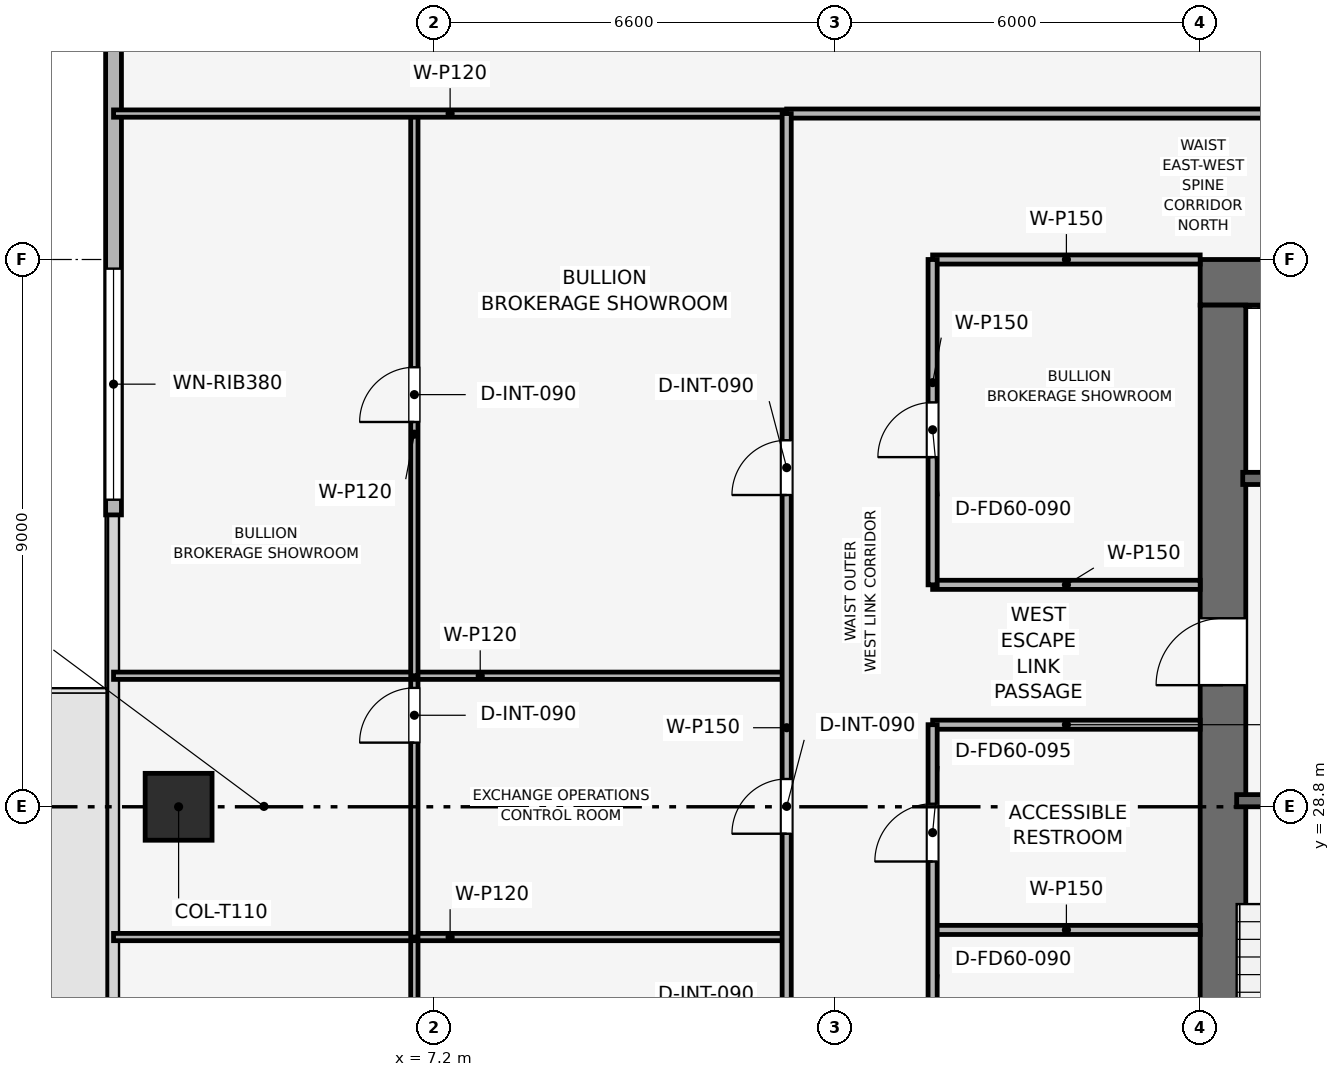
"""IFC4 building model, lengths in metres.
Left out: names, types, materials, properties, quantities, classifications, styles, units other than length and angle.
Written with IfcOpenShell. Run it as: python <this file> out.ifc"""

import sys

from ifc_helpers import new_model, si_unit, direction, frame, frame_2d, origin, origin_2d, place, context, subcontext, project, spatial, rectangle, extrude, element, fill, save


model = new_model("IFC4")
c1 = context("Model", 3, precision=1e-05, world=origin(), true_north=direction((0.0, 1.0)))
c2 = subcontext(c1, "Body", "Model", "MODEL_VIEW")
j1 = project(units=[si_unit("LENGTHUNIT", "METRE"), si_unit("PLANEANGLEUNIT", "RADIAN")], contexts=[c1])
p1 = place(None, origin())
s1 = spatial("IfcSite", under=j1, at=p1, CompositionType="ELEMENT")
p2 = place(p1, origin())
s2 = spatial("IfcBuilding", under=s1, at=p2, CompositionType="ELEMENT")
p3 = place(p2, frame((0.0, 0.0, 199.95)))
s3 = spatial("IfcBuildingStorey", under=s2, at=p3, CompositionType="ELEMENT", Elevation=199.95)
p4 = place(p3, frame((19.8, 37.425, 0.0), z_axis=(0.0, 0.0, 1.0), x_axis=(1.0, 0.0, 0.0)))
e1 = element("IfcWall", 1, at=p4, inside=s3, PredefinedType="SHEAR", context=c2, shape_type="SweptSolid", body=[
    extrude(rectangle(XDim=18.0, YDim=0.75, at=frame_2d((9.0, 0.0))), origin(), (0.0, 0.0, 1.0), 3.75),
])
p5 = place(p4, frame((7.05, 0.0, 0.0)))
e2 = element("IfcOpeningElement", 2, at=p5, cuts=e1, PredefinedType="OPENING", context=c2, shape_type="SweptSolid", body=[
    extrude(rectangle(XDim=1.1, YDim=2.15, at=frame_2d((0.55, 1.075))), frame((0.0, 0.385, 0.0), z_axis=(0.0, -1.0, 0.0), x_axis=(1.0, 0.0, 0.0)), (0.0, 0.0, 1.0), 0.77),
])
p6 = place(p3, frame((20.175, 20.55, 0.0), z_axis=(0.0, 0.0, 1.0), x_axis=(0.0, 1.0, 0.0)))
e3 = element("IfcWall", 3, at=p6, inside=s3, PredefinedType="SHEAR", context=c2, shape_type="SweptSolid", body=[
    extrude(rectangle(XDim=16.5, YDim=0.75, at=frame_2d((8.25, 0.0))), origin(), (0.0, 0.0, 1.0), 3.75),
])
p7 = place(p6, frame((10.25, 0.0, 0.0)))
e4 = element("IfcOpeningElement", 4, at=p7, cuts=e3, PredefinedType="OPENING", context=c2, shape_type="SweptSolid", body=[
    extrude(rectangle(XDim=1.1, YDim=2.15, at=frame_2d((0.55, 1.075))), frame((0.0, 0.385, 0.0), z_axis=(0.0, -1.0, 0.0), x_axis=(1.0, 0.0, 0.0)), (0.0, 0.0, 1.0), 0.77),
])
p8 = place(p3, frame((3.0, 28.8, 0.003), z_axis=(0.0, 0.0, 1.0), x_axis=(1.0, 0.0, 0.0)))
e5 = element("IfcColumn", 5, at=p8, inside=s3, PredefinedType="COLUMN", context=c2, shape_type="SweptSolid", body=[
    extrude(rectangle(XDim=1.1, YDim=1.1, at=origin_2d()), origin(), (0.0, 0.0, 1.0), 3.494),
])
p9 = place(p3, frame((1.93, 33.6, 0.0), z_axis=(0.0, 0.0, 1.0), x_axis=(0.0, 1.0, 0.0)))
e6 = element("IfcWall", 6, at=p9, inside=s3, PredefinedType="SOLIDWALL", context=c2, shape_type="SweptSolid", body=[
    extrude(rectangle(XDim=14.7, YDim=0.26, at=frame_2d((7.35, 0.0))), origin(), (0.0, 0.0, 1.0), 3.5),
])
p10 = place(p9, frame((0.25, 0.0, 0.9)))
e7 = element("IfcOpeningElement", 7, at=p10, cuts=e6, PredefinedType="OPENING", context=c2, shape_type="SweptSolid", body=[
    extrude(rectangle(XDim=3.8, YDim=1.9, at=frame_2d((1.9, 0.95))), frame((0.0, 0.14, 0.0), z_axis=(0.0, -1.0, 0.0), x_axis=(1.0, 0.0, 0.0)), (0.0, 0.0, 1.0), 0.28),
])
p11 = place(p3, frame((20.4, 28.9, 0.0), z_axis=(0.0, 0.0, 1.0), x_axis=(1.0, 0.0, 0.0)))
e8 = element("IfcWall", 8, at=p11, inside=s3, PredefinedType="SHEAR", context=c2, shape_type="SweptSolid", body=[
    extrude(rectangle(XDim=3.15, YDim=0.2, at=frame_2d((1.575, 0.0))), origin(), (0.0, 0.0, 1.0), 3.5),
])
p12 = place(p11, frame((0.8, 0.0, 0.0)))
e9 = element("IfcOpeningElement", 9, at=p12, cuts=e8, PredefinedType="OPENING", context=c2, shape_type="SweptSolid", body=[
    extrude(rectangle(XDim=1.0, YDim=2.1, at=frame_2d((0.5, 1.05))), frame((0.0, 0.11, 0.0), z_axis=(0.0, -1.0, 0.0), x_axis=(1.0, 0.0, 0.0)), (0.0, 0.0, 1.0), 0.22),
])
p13 = place(p3, frame((20.5, 34.2, 0.0), z_axis=(0.0, 0.0, 1.0), x_axis=(1.0, 0.0, 0.0)))
e10 = element("IfcWall", 10, at=p13, inside=s3, PredefinedType="SHEAR", context=c2, shape_type="SweptSolid", body=[
    extrude(rectangle(XDim=3.05, YDim=0.2, at=frame_2d((1.525, 0.0))), origin(), (0.0, 0.0, 1.0), 3.5),
])
p14 = place(p13, frame((0.75, 0.0, 0.0)))
e11 = element("IfcOpeningElement", 11, at=p14, cuts=e10, PredefinedType="OPENING", context=c2, shape_type="SweptSolid", body=[
    extrude(rectangle(XDim=1.1, YDim=2.15, at=frame_2d((0.55, 1.075))), frame((0.0, 0.11, 0.0), z_axis=(0.0, -1.0, 0.0), x_axis=(1.0, 0.0, 0.0)), (0.0, 0.0, 1.0), 0.22),
])
for number, where, z_axis, x_axis in (
    (12, (15.4, 26.775, 0.0), (0.0, 0.0, 1.0), (1.0, 0.0, 0.0)),
    (13, (15.4, 30.15, 0.0), (0.0, 0.0, 1.0), (1.0, 0.0, 0.0)),
    (14, (15.4, 32.45, 0.0), (0.0, 0.0, 1.0), (1.0, 0.0, 0.0)),
):
    element("IfcWall", number, at=place(p3, frame(where, z_axis=z_axis, x_axis=x_axis)), inside=s3, PredefinedType="PARTITIONING", context=c2, shape_type="SweptSolid", body=[
        extrude(rectangle(XDim=4.4, YDim=0.15, at=frame_2d((2.2, 0.0))), origin(), (0.0, 0.0, 1.0), 3.5),
    ])
p15 = place(p3, frame((15.4, 37.8, 0.0), z_axis=(0.0, 0.0, 1.0), x_axis=(1.0, 0.0, 0.0)))
e15 = element("IfcWall", 15, at=p15, inside=s3, PredefinedType="PARTITIONING", context=c2, shape_type="SweptSolid", body=[
    extrude(rectangle(XDim=4.4, YDim=0.15, at=frame_2d((2.2, 0.0))), origin(), (0.0, 0.0, 1.0), 3.035),
])
p16 = place(p3, frame((15.4, 19.8, 0.0), z_axis=(0.0, 0.0, 1.0), x_axis=(0.0, 1.0, 0.0)))
e16 = element("IfcWall", 16, at=p16, inside=s3, PredefinedType="PARTITIONING", context=c2, shape_type="SweptSolid", body=[
    extrude(rectangle(XDim=10.35, YDim=0.15, at=frame_2d((5.175, 0.0))), origin(), (0.0, 0.0, 1.0), 3.035),
])
p17 = place(p16, frame((1.2, 0.0, 0.0)))
e17 = element("IfcOpeningElement", 17, at=p17, cuts=e16, PredefinedType="OPENING", context=c2, shape_type="SweptSolid", body=[
    extrude(rectangle(XDim=0.9, YDim=2.1, at=frame_2d((0.45, 1.05))), frame((0.0, 0.085, 0.0), z_axis=(0.0, -1.0, 0.0), x_axis=(1.0, 0.0, 0.0)), (0.0, 0.0, 1.0), 0.17),
])
p18 = place(p16, frame((4.7, 0.0, 0.0)))
e18 = element("IfcOpeningElement", 18, at=p18, cuts=e16, PredefinedType="OPENING", context=c2, shape_type="SweptSolid", body=[
    extrude(rectangle(XDim=0.9, YDim=2.1, at=frame_2d((0.45, 1.05))), frame((0.0, 0.085, 0.0), z_axis=(0.0, -1.0, 0.0), x_axis=(1.0, 0.0, 0.0)), (0.0, 0.0, 1.0), 0.17),
])
p19 = place(p16, frame((8.1, 0.0, 0.0)))
e19 = element("IfcOpeningElement", 19, at=p19, cuts=e16, PredefinedType="OPENING", context=c2, shape_type="SweptSolid", body=[
    extrude(rectangle(XDim=0.95, YDim=2.1, at=frame_2d((0.475, 1.05))), frame((0.0, 0.085, 0.0), z_axis=(0.0, -1.0, 0.0), x_axis=(1.0, 0.0, 0.0)), (0.0, 0.0, 1.0), 0.17),
])
p20 = place(p3, frame((15.4, 32.45, 0.0), z_axis=(0.0, 0.0, 1.0), x_axis=(0.0, 1.0, 0.0)))
e20 = element("IfcWall", 20, at=p20, inside=s3, PredefinedType="PARTITIONING", context=c2, shape_type="SweptSolid", body=[
    extrude(rectangle(XDim=5.35, YDim=0.15, at=frame_2d((2.675, 0.0))), origin(), (0.0, 0.0, 1.0), 3.035),
])
p21 = place(p20, frame((2.1, 0.0, 0.0)))
e21 = element("IfcOpeningElement", 21, at=p21, cuts=e20, PredefinedType="OPENING", context=c2, shape_type="SweptSolid", body=[
    extrude(rectangle(XDim=0.9, YDim=2.1, at=frame_2d((0.45, 1.05))), frame((0.0, 0.085, 0.0), z_axis=(0.0, -1.0, 0.0), x_axis=(1.0, 0.0, 0.0)), (0.0, 0.0, 1.0), 0.17),
])
p22 = place(p3, frame((6.877, 22.1, 0.0), z_axis=(0.0, 0.0, 1.0), x_axis=(0.0, 1.0, 0.0)))
e22 = element("IfcWall", 22, at=p22, inside=s3, PredefinedType="PARTITIONING", context=c2, shape_type="SweptSolid", body=[
    extrude(rectangle(XDim=4.558, YDim=0.12, at=frame_2d((2.279, 0.0))), origin(), (0.0, 0.0, 1.0), 3.5),
])
p23 = place(p22, frame((0.2, 0.0, 0.0)))
e23 = element("IfcOpeningElement", 23, at=p23, cuts=e22, PredefinedType="OPENING", context=c2, shape_type="SweptSolid", body=[
    extrude(rectangle(XDim=0.9, YDim=2.1, at=frame_2d((0.45, 1.05))), frame((0.0, 0.07, 0.0), z_axis=(0.0, -1.0, 0.0), x_axis=(1.0, 0.0, 0.0)), (0.0, 0.0, 1.0), 0.14),
])
p24 = place(p3, frame((1.93, 26.658, 0.0), z_axis=(0.0, 0.0, 1.0), x_axis=(1.0, 0.0, 0.0)))
e24 = element("IfcWall", 24, at=p24, inside=s3, PredefinedType="PARTITIONING", context=c2, shape_type="SweptSolid", body=[
    extrude(rectangle(XDim=11.07, YDim=0.12, at=frame_2d((5.535, 0.0))), origin(), (0.0, 0.0, 1.0), 2.885),
])
p25 = place(p3, frame((6.877, 26.658, 0.0), z_axis=(0.0, 0.0, 1.0), x_axis=(0.0, 1.0, 0.0)))
e25 = element("IfcWall", 25, at=p25, inside=s3, PredefinedType="PARTITIONING", context=c2, shape_type="SweptSolid", body=[
    extrude(rectangle(XDim=4.297, YDim=0.12, at=frame_2d((2.148, 0.0))), origin(), (0.0, 0.0, 1.0), 3.035),
])
p26 = place(p25, frame((3.197, 0.0, 0.0)))
e26 = element("IfcOpeningElement", 26, at=p26, cuts=e25, PredefinedType="OPENING", context=c2, shape_type="SweptSolid", body=[
    extrude(rectangle(XDim=0.9, YDim=2.1, at=frame_2d((0.45, 1.05))), frame((0.0, 0.07, 0.0), z_axis=(0.0, -1.0, 0.0), x_axis=(1.0, 0.0, 0.0)), (0.0, 0.0, 1.0), 0.14),
])
p27 = place(p3, frame((1.93, 30.955, 0.0), z_axis=(0.0, 0.0, 1.0), x_axis=(1.0, 0.0, 0.0)))
e27 = element("IfcWall", 27, at=p27, inside=s3, PredefinedType="PARTITIONING", context=c2, shape_type="SweptSolid", body=[
    extrude(rectangle(XDim=11.07, YDim=0.12, at=frame_2d((5.535, 0.0))), origin(), (0.0, 0.0, 1.0), 2.885),
])
p28 = place(p3, frame((6.877, 30.955, 0.0), z_axis=(0.0, 0.0, 1.0), x_axis=(0.0, 1.0, 0.0)))
e28 = element("IfcWall", 28, at=p28, inside=s3, PredefinedType="PARTITIONING", context=c2, shape_type="SweptSolid", body=[
    extrude(rectangle(XDim=9.245, YDim=0.12, at=frame_2d((4.623, 0.0))), origin(), (0.0, 0.0, 1.0), 3.035),
])
p29 = place(p28, frame((4.173, 0.0, 0.0)))
e29 = element("IfcOpeningElement", 29, at=p29, cuts=e28, PredefinedType="OPENING", context=c2, shape_type="SweptSolid", body=[
    extrude(rectangle(XDim=0.9, YDim=2.1, at=frame_2d((0.45, 1.05))), frame((0.0, 0.07, 0.0), z_axis=(0.0, -1.0, 0.0), x_axis=(1.0, 0.0, 0.0)), (0.0, 0.0, 1.0), 0.14),
])
p30 = place(p3, frame((1.93, 40.2, 0.0), z_axis=(0.0, 0.0, 1.0), x_axis=(1.0, 0.0, 0.0)))
e30 = element("IfcWall", 30, at=p30, inside=s3, PredefinedType="PARTITIONING", context=c2, shape_type="SweptSolid", body=[
    extrude(rectangle(XDim=11.07, YDim=0.12, at=frame_2d((5.535, 0.0))), origin(), (0.0, 0.0, 1.0), 2.885),
])
p31 = place(p3, frame((13.0, 40.2, 0.0), z_axis=(0.0, 0.0, 1.0), x_axis=(1.0, 0.0, 0.0)))
e31 = element("IfcWall", 31, at=p31, inside=s3, PredefinedType="PARTITIONING", context=c2, shape_type="SweptSolid", body=[
    extrude(rectangle(XDim=31.6, YDim=0.15, at=frame_2d((15.8, 0.0))), origin(), (0.0, 0.0, 1.0), 3.035),
])
p32 = place(p31, frame((15.35, 0.0, 0.0)))
e32 = element("IfcOpeningElement", 32, at=p32, cuts=e31, PredefinedType="OPENING", context=c2, shape_type="SweptSolid", body=[
    extrude(rectangle(XDim=0.9, YDim=2.1, at=frame_2d((0.45, 1.05))), frame((0.0, 0.085, 0.0), z_axis=(0.0, -1.0, 0.0), x_axis=(1.0, 0.0, 0.0)), (0.0, 0.0, 1.0), 0.17),
])
p33 = place(p3, frame((13.0, 17.4, 0.0), z_axis=(0.0, 0.0, 1.0), x_axis=(0.0, 1.0, 0.0)))
e33 = element("IfcWall", 33, at=p33, inside=s3, PredefinedType="PARTITIONING", context=c2, shape_type="SweptSolid", body=[
    extrude(rectangle(XDim=22.8, YDim=0.15, at=frame_2d((11.4, 0.0))), origin(), (0.0, 0.0, 1.0), 3.035),
])
p34 = place(p33, frame((3.1, 0.0, 0.0)))
e34 = element("IfcOpeningElement", 34, at=p34, cuts=e33, PredefinedType="OPENING", context=c2, shape_type="SweptSolid", body=[
    extrude(rectangle(XDim=0.9, YDim=2.1, at=frame_2d((0.45, 1.05))), frame((0.0, 0.085, 0.0), z_axis=(0.0, -1.0, 0.0), x_axis=(1.0, 0.0, 0.0)), (0.0, 0.0, 1.0), 0.17),
])
p35 = place(p33, frame((6.529, 0.0, 0.0)))
e35 = element("IfcOpeningElement", 35, at=p35, cuts=e33, PredefinedType="OPENING", context=c2, shape_type="SweptSolid", body=[
    extrude(rectangle(XDim=0.9, YDim=2.1, at=frame_2d((0.45, 1.05))), frame((0.0, 0.085, 0.0), z_axis=(0.0, -1.0, 0.0), x_axis=(1.0, 0.0, 0.0)), (0.0, 0.0, 1.0), 0.17),
])
p36 = place(p33, frame((10.957, 0.0, 0.0)))
e36 = element("IfcOpeningElement", 36, at=p36, cuts=e33, PredefinedType="OPENING", context=c2, shape_type="SweptSolid", body=[
    extrude(rectangle(XDim=0.9, YDim=2.1, at=frame_2d((0.45, 1.05))), frame((0.0, 0.085, 0.0), z_axis=(0.0, -1.0, 0.0), x_axis=(1.0, 0.0, 0.0)), (0.0, 0.0, 1.0), 0.17),
])
p37 = place(p33, frame((16.527, 0.0, 0.0)))
e37 = element("IfcOpeningElement", 37, at=p37, cuts=e33, PredefinedType="OPENING", context=c2, shape_type="SweptSolid", body=[
    extrude(rectangle(XDim=0.9, YDim=2.1, at=frame_2d((0.45, 1.05))), frame((0.0, 0.085, 0.0), z_axis=(0.0, -1.0, 0.0), x_axis=(1.0, 0.0, 0.0)), (0.0, 0.0, 1.0), 0.17),
])
p38 = place(p10, origin())
e38 = element("IfcWindow", 38, at=p38, inside=s3, PartitioningType="SINGLE_PANEL", PredefinedType="WINDOW", context=c2, shape_type="SweptSolid", body=[
    extrude(rectangle(XDim=3.8, YDim=1.9, at=frame_2d((1.9, 0.95))), frame((0.0, 0.03, 0.0), z_axis=(0.0, -1.0, 0.0), x_axis=(1.0, 0.0, 0.0)), (0.0, 0.0, 1.0), 0.06),
])
fill(e7, e38)
p39 = place(p19, origin())
e39 = element("IfcDoor", 39, at=p39, inside=s3, OperationType="SINGLE_SWING_LEFT", PredefinedType="DOOR", context=c2, shape_type="SweptSolid", body=[
    extrude(rectangle(XDim=0.95, YDim=2.1, at=frame_2d((0.475, 1.05))), frame((0.0, 0.025, 0.0), z_axis=(0.0, -1.0, 0.0), x_axis=(1.0, 0.0, 0.0)), (0.0, 0.0, 1.0), 0.05),
])
fill(e19, e39)
p40 = place(p21, origin())
e40 = element("IfcDoor", 40, at=p40, inside=s3, OperationType="SINGLE_SWING_LEFT", PredefinedType="DOOR", context=c2, shape_type="SweptSolid", body=[
    extrude(rectangle(XDim=0.9, YDim=2.1, at=frame_2d((0.45, 1.05))), frame((0.0, 0.025, 0.0), z_axis=(0.0, -1.0, 0.0), x_axis=(1.0, 0.0, 0.0)), (0.0, 0.0, 1.0), 0.05),
])
fill(e21, e40)
p41 = place(p26, origin())
e41 = element("IfcDoor", 41, at=p41, inside=s3, OperationType="SINGLE_SWING_LEFT", PredefinedType="DOOR", context=c2, shape_type="SweptSolid", body=[
    extrude(rectangle(XDim=0.9, YDim=2.1, at=frame_2d((0.45, 1.05))), frame((0.0, 0.025, 0.0), z_axis=(0.0, -1.0, 0.0), x_axis=(1.0, 0.0, 0.0)), (0.0, 0.0, 1.0), 0.05),
])
fill(e26, e41)
p42 = place(p29, origin())
e42 = element("IfcDoor", 42, at=p42, inside=s3, OperationType="SINGLE_SWING_LEFT", PredefinedType="DOOR", context=c2, shape_type="SweptSolid", body=[
    extrude(rectangle(XDim=0.9, YDim=2.1, at=frame_2d((0.45, 1.05))), frame((0.0, 0.025, 0.0), z_axis=(0.0, -1.0, 0.0), x_axis=(1.0, 0.0, 0.0)), (0.0, 0.0, 1.0), 0.05),
])
fill(e29, e42)
p43 = place(p36, origin())
e43 = element("IfcDoor", 43, at=p43, inside=s3, OperationType="SINGLE_SWING_LEFT", PredefinedType="DOOR", context=c2, shape_type="SweptSolid", body=[
    extrude(rectangle(XDim=0.9, YDim=2.1, at=frame_2d((0.45, 1.05))), frame((0.0, 0.025, 0.0), z_axis=(0.0, -1.0, 0.0), x_axis=(1.0, 0.0, 0.0)), (0.0, 0.0, 1.0), 0.05),
])
fill(e36, e43)
p44 = place(p37, origin())
e44 = element("IfcDoor", 44, at=p44, inside=s3, OperationType="SINGLE_SWING_LEFT", PredefinedType="DOOR", context=c2, shape_type="SweptSolid", body=[
    extrude(rectangle(XDim=0.9, YDim=2.1, at=frame_2d((0.45, 1.05))), frame((0.0, 0.025, 0.0), z_axis=(0.0, -1.0, 0.0), x_axis=(1.0, 0.0, 0.0)), (0.0, 0.0, 1.0), 0.05),
])
fill(e37, e44)
p45 = place(p7, origin())
e45 = element("IfcDoor", 45, at=p45, inside=s3, OperationType="SINGLE_SWING_LEFT", PredefinedType="DOOR", context=c2, shape_type="SweptSolid", body=[
    extrude(rectangle(XDim=1.1, YDim=2.15, at=frame_2d((0.55, 1.075))), frame((0.0, 0.025, 0.0), z_axis=(0.0, -1.0, 0.0), x_axis=(1.0, 0.0, 0.0)), (0.0, 0.0, 1.0), 0.05),
])
fill(e4, e45)
save(model, sys.argv[1])
